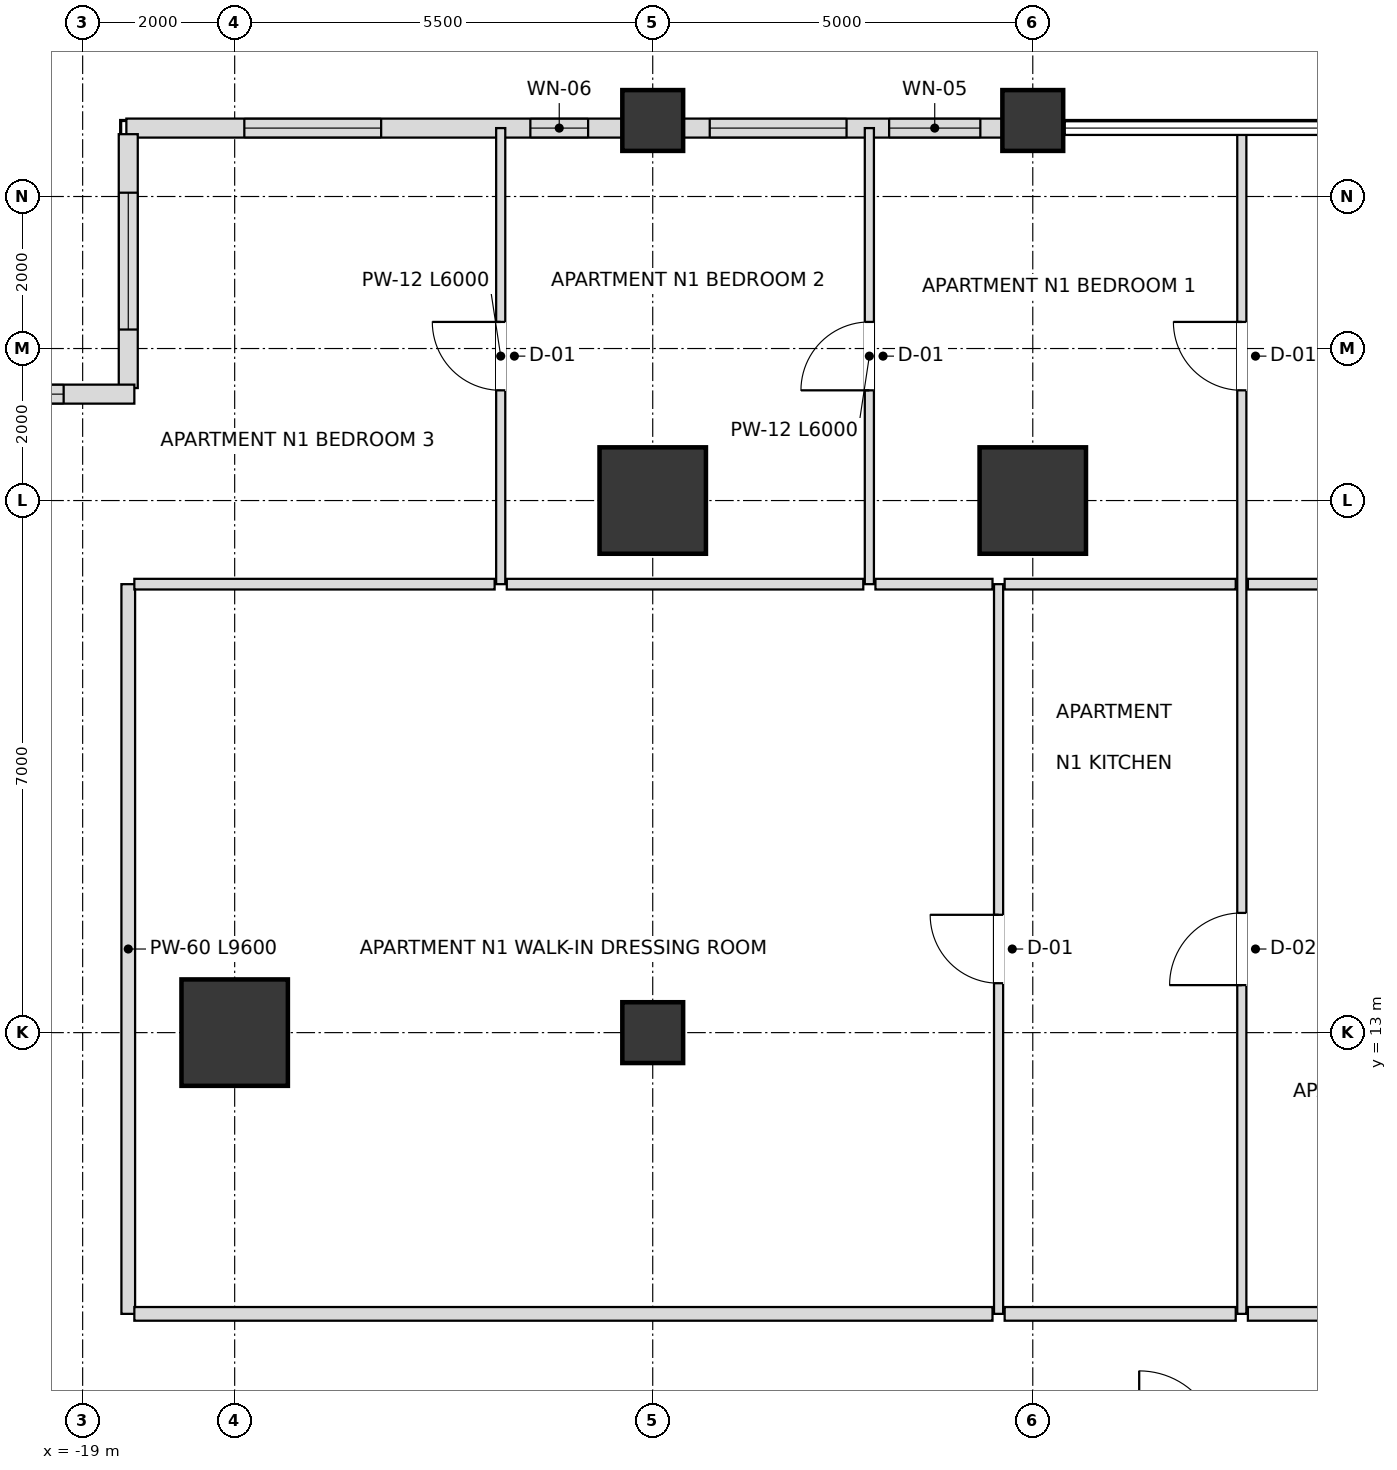
"""IFC4 building model, lengths in metres.
Left out: names, types, materials, properties, quantities, classifications, styles, units other than length and angle.
Written with IfcOpenShell. Run it as: python <this file> out.ifc"""

import sys

from ifc_helpers import new_model, si_unit, direction, frame, frame_2d, origin, origin_2d, place, context, subcontext, project, spatial, rectangle, extrude, element, fill, save


model = new_model("IFC4")
c1 = context("Model", 3, precision=1e-05, world=origin(), true_north=direction((0.0, 1.0)))
c2 = subcontext(c1, "Body", "Model", "MODEL_VIEW")
j1 = project(units=[si_unit("LENGTHUNIT", "METRE"), si_unit("PLANEANGLEUNIT", "RADIAN")], contexts=[c1])
p1 = place(None, origin())
s1 = spatial("IfcSite", under=j1, at=p1, CompositionType="ELEMENT")
p2 = place(p1, origin())
s2 = spatial("IfcBuilding", under=s1, at=p2, CompositionType="ELEMENT")
p3 = place(p2, frame((0.0, 0.0, 57.6)))
s3 = spatial("IfcBuildingStorey", under=s2, at=p3, CompositionType="ELEMENT", Elevation=57.6)
for number, where, z_axis, x_axis in (
    (1, (-6.5, 20.0, 0.0), (0.0, 0.0, 1.0), (1.0, 0.0, 0.0)),
    (2, (-11.5, 20.0, 0.0), (0.0, 0.0, 1.0), (1.0, 0.0, 0.0)),
    (3, (-17.0, 13.0, 0.0), (0.0, 0.0, 1.0), (1.0, 0.0, 0.0)),
):
    element("IfcColumn", number, at=place(p3, frame(where, z_axis=z_axis, x_axis=x_axis)), inside=s3, PredefinedType="USERDEFINED", context=c2, shape_type="SweptSolid", body=[
        extrude(rectangle(XDim=1.4, YDim=1.4, at=origin_2d()), origin(), (0.0, 0.0, 1.0), 3.6),
    ])
for number, where, z_axis, x_axis in (
    (4, (-11.5, 13.0, 0.0), (0.0, 0.0, 1.0), (1.0, 0.0, 0.0)),
    (5, (-11.5, 25.0, 0.0), (0.0, 0.0, 1.0), (1.0, 0.0, 0.0)),
    (6, (-6.5, 25.0, 0.0), (0.0, 0.0, 1.0), (1.0, 0.0, 0.0)),
):
    element("IfcColumn", number, at=place(p3, frame(where, z_axis=z_axis, x_axis=x_axis)), inside=s3, PredefinedType="COLUMN", context=c2, shape_type="SweptSolid", body=[
        extrude(rectangle(XDim=0.8, YDim=0.8, at=origin_2d()), origin(), (0.0, 0.0, 1.0), 3.6),
    ])
p4 = place(p3, frame((-6.895, 24.9, 0.0), z_axis=(0.0, 0.0, 1.0), x_axis=(-1.0, 0.0, 0.0)))
e7 = element("IfcWall", 7, at=p4, inside=s3, PredefinedType="SOLIDWALL", context=c2, shape_type="SweptSolid", body=[
    extrude(rectangle(XDim=4.21, YDim=0.25, at=frame_2d((2.105, 0.0))), origin(), (0.0, 0.0, 1.0), 2.736),
])
p5 = place(p4, frame((0.295, 0.0, 0.72)))
e8 = element("IfcOpeningElement", 8, at=p5, cuts=e7, PredefinedType="OPENING", context=c2, shape_type="SweptSolid", body=[
    extrude(rectangle(XDim=1.2, YDim=1.68, at=frame_2d((0.6, 0.84))), frame((0.0, 0.135, 0.0), z_axis=(0.0, -1.0, 0.0), x_axis=(1.0, 0.0, 0.0)), (0.0, 0.0, 1.0), 0.27),
])
p6 = place(p4, frame((2.055, 0.0, 0.72)))
e9 = element("IfcOpeningElement", 9, at=p6, cuts=e7, PredefinedType="OPENING", context=c2, shape_type="SweptSolid", body=[
    extrude(rectangle(XDim=1.8, YDim=1.68, at=frame_2d((0.9, 0.84))), frame((0.0, 0.135, 0.0), z_axis=(0.0, -1.0, 0.0), x_axis=(1.0, 0.0, 0.0)), (0.0, 0.0, 1.0), 0.27),
])
p7 = place(p3, frame((-11.895, 24.9, 0.0), z_axis=(0.0, 0.0, 1.0), x_axis=(-1.0, 0.0, 0.0)))
e10 = element("IfcWall", 10, at=p7, inside=s3, PredefinedType="SOLIDWALL", context=c2, shape_type="SweptSolid", body=[
    extrude(rectangle(XDim=6.53, YDim=0.25, at=frame_2d((3.265, 0.0))), origin(), (0.0, 0.0, 1.0), 2.736),
])
p8 = place(p7, frame((0.455, 0.0, 0.72)))
e11 = element("IfcOpeningElement", 11, at=p8, cuts=e10, PredefinedType="OPENING", context=c2, shape_type="SweptSolid", body=[
    extrude(rectangle(XDim=0.76, YDim=1.68, at=frame_2d((0.38, 0.84))), frame((0.0, 0.135, 0.0), z_axis=(0.0, -1.0, 0.0), x_axis=(1.0, 0.0, 0.0)), (0.0, 0.0, 1.0), 0.27),
])
p9 = place(p7, frame((3.178, 0.0, 0.72)))
e12 = element("IfcOpeningElement", 12, at=p9, cuts=e10, PredefinedType="OPENING", context=c2, shape_type="SweptSolid", body=[
    extrude(rectangle(XDim=1.8, YDim=1.68, at=frame_2d((0.9, 0.84))), frame((0.0, 0.135, 0.0), z_axis=(0.0, -1.0, 0.0), x_axis=(1.0, 0.0, 0.0)), (0.0, 0.0, 1.0), 0.27),
])
p10 = place(p3, frame((-18.4, 24.82, 0.0), z_axis=(0.0, 0.0, 1.0), x_axis=(0.0, -1.0, 0.0)))
e13 = element("IfcWall", 13, at=p10, inside=s3, PredefinedType="SOLIDWALL", context=c2, shape_type="SweptSolid", body=[
    extrude(rectangle(XDim=3.34, YDim=0.25, at=frame_2d((1.67, 0.0))), origin(), (0.0, 0.0, 1.0), 2.736),
])
p11 = place(p10, frame((0.77, 0.0, 0.72)))
e14 = element("IfcOpeningElement", 14, at=p11, cuts=e13, PredefinedType="OPENING", context=c2, shape_type="SweptSolid", body=[
    extrude(rectangle(XDim=1.8, YDim=1.68, at=frame_2d((0.9, 0.84))), frame((0.0, 0.135, 0.0), z_axis=(0.0, -1.0, 0.0), x_axis=(1.0, 0.0, 0.0)), (0.0, 0.0, 1.0), 0.27),
])
p12 = place(p3, frame((-18.32, 21.4, 0.0), z_axis=(0.0, 0.0, 1.0), x_axis=(-1.0, 0.0, 0.0)))
e15 = element("IfcWall", 15, at=p12, inside=s3, PredefinedType="SOLIDWALL", context=c2, shape_type="SweptSolid", body=[
    extrude(rectangle(XDim=3.66, YDim=0.25, at=frame_2d((1.83, 0.0))), origin(), (0.0, 0.0, 1.0), 2.736),
])
p13 = place(p12, frame((0.93, 0.0, 0.72)))
e16 = element("IfcOpeningElement", 16, at=p13, cuts=e15, PredefinedType="OPENING", context=c2, shape_type="SweptSolid", body=[
    extrude(rectangle(XDim=1.8, YDim=1.68, at=frame_2d((0.9, 0.84))), frame((0.0, 0.135, 0.0), z_axis=(0.0, -1.0, 0.0), x_axis=(1.0, 0.0, 0.0)), (0.0, 0.0, 1.0), 0.27),
])
p14 = place(p3, frame((-18.4, 9.3, 0.0), z_axis=(0.0, 0.0, 1.0), x_axis=(0.0, 1.0, 0.0)))
e17 = element("IfcWall", 17, at=p14, inside=s3, PredefinedType="PARTITIONING", context=c2, shape_type="SweptSolid", body=[
    extrude(rectangle(XDim=9.6, YDim=0.18, at=frame_2d((4.8, 0.0))), origin(), (0.0, 0.0, 1.0), 2.736),
])
p15 = place(p3, frame((-13.5, 18.9, 0.0), z_axis=(0.0, 0.0, 1.0), x_axis=(0.0, 1.0, 0.0)))
e18 = element("IfcWall", 18, at=p15, inside=s3, PredefinedType="PARTITIONING", context=c2, shape_type="SweptSolid", body=[
    extrude(rectangle(XDim=6.0, YDim=0.12, at=frame_2d((3.0, 0.0))), origin(), (0.0, 0.0, 1.0), 2.736),
])
p16 = place(p15, frame((2.55, 0.0, 0.0)))
e19 = element("IfcOpeningElement", 19, at=p16, cuts=e18, PredefinedType="OPENING", context=c2, shape_type="SweptSolid", body=[
    extrude(rectangle(XDim=0.9, YDim=2.1, at=frame_2d((0.45, 1.05))), frame((0.0, 0.07, 0.0), z_axis=(0.0, -1.0, 0.0), x_axis=(1.0, 0.0, 0.0)), (0.0, 0.0, 1.0), 0.14),
])
p17 = place(p3, frame((-8.65, 18.9, 0.0), z_axis=(0.0, 0.0, 1.0), x_axis=(0.0, 1.0, 0.0)))
e20 = element("IfcWall", 20, at=p17, inside=s3, PredefinedType="PARTITIONING", context=c2, shape_type="SweptSolid", body=[
    extrude(rectangle(XDim=6.0, YDim=0.12, at=frame_2d((3.0, 0.0))), origin(), (0.0, 0.0, 1.0), 2.816),
])
p18 = place(p17, frame((2.55, 0.0, 0.0)))
e21 = element("IfcOpeningElement", 21, at=p18, cuts=e20, PredefinedType="OPENING", context=c2, shape_type="SweptSolid", body=[
    extrude(rectangle(XDim=0.9, YDim=2.1, at=frame_2d((0.45, 1.05))), frame((0.0, 0.07, 0.0), z_axis=(0.0, -1.0, 0.0), x_axis=(1.0, 0.0, 0.0)), (0.0, 0.0, 1.0), 0.14),
])
p19 = place(p3, frame((-6.95, 9.3, 0.0), z_axis=(0.0, 0.0, 1.0), x_axis=(0.0, 1.0, 0.0)))
e22 = element("IfcWall", 22, at=p19, inside=s3, PredefinedType="PARTITIONING", context=c2, shape_type="SweptSolid", body=[
    extrude(rectangle(XDim=9.6, YDim=0.12, at=frame_2d((4.8, 0.0))), origin(), (0.0, 0.0, 1.0), 2.816),
])
p20 = place(p19, frame((4.35, 0.0, 0.0)))
e23 = element("IfcOpeningElement", 23, at=p20, cuts=e22, PredefinedType="OPENING", context=c2, shape_type="SweptSolid", body=[
    extrude(rectangle(XDim=0.9, YDim=2.1, at=frame_2d((0.45, 1.05))), frame((0.0, 0.07, 0.0), z_axis=(0.0, -1.0, 0.0), x_axis=(1.0, 0.0, 0.0)), (0.0, 0.0, 1.0), 0.14),
])
p21 = place(p3, frame((-3.75, 9.3, 0.0), z_axis=(0.0, 0.0, 1.0), x_axis=(0.0, 1.0, 0.0)))
e24 = element("IfcWall", 24, at=p21, inside=s3, PredefinedType="PARTITIONING", context=c2, shape_type="SweptSolid", body=[
    extrude(rectangle(XDim=15.6, YDim=0.12, at=frame_2d((7.8, 0.0))), origin(), (0.0, 0.0, 1.0), 2.816),
])
p22 = place(p21, frame((4.325, 0.0, 0.0)))
e25 = element("IfcOpeningElement", 25, at=p22, cuts=e24, PredefinedType="OPENING", context=c2, shape_type="SweptSolid", body=[
    extrude(rectangle(XDim=0.95, YDim=2.1, at=frame_2d((0.475, 1.05))), frame((0.0, 0.07, 0.0), z_axis=(0.0, -1.0, 0.0), x_axis=(1.0, 0.0, 0.0)), (0.0, 0.0, 1.0), 0.14),
])
p23 = place(p21, frame((12.15, 0.0, 0.0)))
e26 = element("IfcOpeningElement", 26, at=p23, cuts=e24, PredefinedType="OPENING", context=c2, shape_type="SweptSolid", body=[
    extrude(rectangle(XDim=0.9, YDim=2.1, at=frame_2d((0.45, 1.05))), frame((0.0, 0.07, 0.0), z_axis=(0.0, -1.0, 0.0), x_axis=(1.0, 0.0, 0.0)), (0.0, 0.0, 1.0), 0.14),
])
p24 = place(p3, frame((-18.32, 9.3, 0.0), z_axis=(0.0, 0.0, 1.0), x_axis=(1.0, 0.0, 0.0)))
e27 = element("IfcWall", 27, at=p24, inside=s3, PredefinedType="PARTITIONING", context=c2, shape_type="SweptSolid", body=[
    extrude(rectangle(XDim=11.29, YDim=0.18, at=frame_2d((5.645, 0.0))), origin(), (0.0, 0.0, 1.0), 2.816),
])
p25 = place(p3, frame((-6.87, 9.3, 0.0), z_axis=(0.0, 0.0, 1.0), x_axis=(1.0, 0.0, 0.0)))
e28 = element("IfcWall", 28, at=p25, inside=s3, PredefinedType="PARTITIONING", context=c2, shape_type="SweptSolid", body=[
    extrude(rectangle(XDim=3.04, YDim=0.18, at=frame_2d((1.52, 0.0))), origin(), (0.0, 0.0, 1.0), 2.816),
])
p26 = place(p3, frame((-3.67, 9.3, 0.0), z_axis=(0.0, 0.0, 1.0), x_axis=(1.0, 0.0, 0.0)))
e29 = element("IfcWall", 29, at=p26, inside=s3, PredefinedType="PARTITIONING", context=c2, shape_type="SweptSolid", body=[
    extrude(rectangle(XDim=4.04, YDim=0.18, at=frame_2d((2.02, 0.0))), origin(), (0.0, 0.0, 1.0), 3.38),
])
p27 = place(p26, frame((1.535, 0.0, 0.0)))
e30 = element("IfcOpeningElement", 30, at=p27, cuts=e29, PredefinedType="OPENING", context=c2, shape_type="SweptSolid", body=[
    extrude(rectangle(XDim=0.95, YDim=2.15, at=frame_2d((0.475, 1.075))), frame((0.0, 0.1, 0.0), z_axis=(0.0, -1.0, 0.0), x_axis=(1.0, 0.0, 0.0)), (0.0, 0.0, 1.0), 0.2),
])
p28 = place(p3, frame((-18.32, 18.9, 0.0), z_axis=(0.0, 0.0, 1.0), x_axis=(1.0, 0.0, 0.0)))
e31 = element("IfcWall", 31, at=p28, inside=s3, PredefinedType="PARTITIONING", context=c2, shape_type="SweptSolid", body=[
    extrude(rectangle(XDim=4.74, YDim=0.14, at=frame_2d((2.37, 0.0))), origin(), (0.0, 0.0, 1.0), 2.736),
])
p29 = place(p3, frame((-13.42, 18.9, 0.0), z_axis=(0.0, 0.0, 1.0), x_axis=(1.0, 0.0, 0.0)))
e32 = element("IfcWall", 32, at=p29, inside=s3, PredefinedType="PARTITIONING", context=c2, shape_type="SweptSolid", body=[
    extrude(rectangle(XDim=4.69, YDim=0.14, at=frame_2d((2.345, 0.0))), origin(), (0.0, 0.0, 1.0), 2.736),
])
p30 = place(p3, frame((-8.57, 18.9, 0.0), z_axis=(0.0, 0.0, 1.0), x_axis=(1.0, 0.0, 0.0)))
e33 = element("IfcWall", 33, at=p30, inside=s3, PredefinedType="PARTITIONING", context=c2, shape_type="SweptSolid", body=[
    extrude(rectangle(XDim=1.54, YDim=0.14, at=frame_2d((0.77, 0.0))), origin(), (0.0, 0.0, 1.0), 3.38),
])
p31 = place(p3, frame((-6.87, 18.9, 0.0), z_axis=(0.0, 0.0, 1.0), x_axis=(1.0, 0.0, 0.0)))
e34 = element("IfcWall", 34, at=p31, inside=s3, PredefinedType="PARTITIONING", context=c2, shape_type="SweptSolid", body=[
    extrude(rectangle(XDim=3.04, YDim=0.14, at=frame_2d((1.52, 0.0))), origin(), (0.0, 0.0, 1.0), 2.816),
])
p32 = place(p3, frame((-3.67, 18.9, 0.0), z_axis=(0.0, 0.0, 1.0), x_axis=(1.0, 0.0, 0.0)))
e35 = element("IfcWall", 35, at=p32, inside=s3, PredefinedType="PARTITIONING", context=c2, shape_type="SweptSolid", body=[
    extrude(rectangle(XDim=4.04, YDim=0.14, at=frame_2d((2.02, 0.0))), origin(), (0.0, 0.0, 1.0), 3.38),
])
p33 = place(p32, frame((1.535, 0.0, 0.0)))
e36 = element("IfcOpeningElement", 36, at=p33, cuts=e35, PredefinedType="OPENING", context=c2, shape_type="SweptSolid", body=[
    extrude(rectangle(XDim=0.95, YDim=2.1, at=frame_2d((0.475, 1.05))), frame((0.0, 0.08, 0.0), z_axis=(0.0, -1.0, 0.0), x_axis=(1.0, 0.0, 0.0)), (0.0, 0.0, 1.0), 0.16),
])
p34 = place(p5, origin())
e37 = element("IfcWindow", 37, at=p34, inside=s3, PartitioningType="SINGLE_PANEL", PredefinedType="WINDOW", context=c2, shape_type="SweptSolid", body=[
    extrude(rectangle(XDim=1.2, YDim=1.68, at=frame_2d((0.6, 0.84))), frame((0.0, 0.03, 0.0), z_axis=(0.0, -1.0, 0.0), x_axis=(1.0, 0.0, 0.0)), (0.0, 0.0, 1.0), 0.06),
])
fill(e8, e37)
p35 = place(p6, origin())
e38 = element("IfcWindow", 38, at=p35, inside=s3, PartitioningType="SINGLE_PANEL", PredefinedType="WINDOW", context=c2, shape_type="SweptSolid", body=[
    extrude(rectangle(XDim=1.8, YDim=1.68, at=frame_2d((0.9, 0.84))), frame((0.0, 0.03, 0.0), z_axis=(0.0, -1.0, 0.0), x_axis=(1.0, 0.0, 0.0)), (0.0, 0.0, 1.0), 0.06),
])
fill(e9, e38)
p36 = place(p8, origin())
e39 = element("IfcWindow", 39, at=p36, inside=s3, PartitioningType="SINGLE_PANEL", PredefinedType="WINDOW", context=c2, shape_type="SweptSolid", body=[
    extrude(rectangle(XDim=0.76, YDim=1.68, at=frame_2d((0.38, 0.84))), frame((0.0, 0.03, 0.0), z_axis=(0.0, -1.0, 0.0), x_axis=(1.0, 0.0, 0.0)), (0.0, 0.0, 1.0), 0.06),
])
fill(e11, e39)
p37 = place(p9, origin())
e40 = element("IfcWindow", 40, at=p37, inside=s3, PartitioningType="SINGLE_PANEL", PredefinedType="WINDOW", context=c2, shape_type="SweptSolid", body=[
    extrude(rectangle(XDim=1.8, YDim=1.68, at=frame_2d((0.9, 0.84))), frame((0.0, 0.03, 0.0), z_axis=(0.0, -1.0, 0.0), x_axis=(1.0, 0.0, 0.0)), (0.0, 0.0, 1.0), 0.06),
])
fill(e12, e40)
p38 = place(p11, origin())
e41 = element("IfcWindow", 41, at=p38, inside=s3, PartitioningType="SINGLE_PANEL", PredefinedType="WINDOW", context=c2, shape_type="SweptSolid", body=[
    extrude(rectangle(XDim=1.8, YDim=1.68, at=frame_2d((0.9, 0.84))), frame((0.0, 0.03, 0.0), z_axis=(0.0, -1.0, 0.0), x_axis=(1.0, 0.0, 0.0)), (0.0, 0.0, 1.0), 0.06),
])
fill(e14, e41)
p39 = place(p13, origin())
e42 = element("IfcWindow", 42, at=p39, inside=s3, PartitioningType="SINGLE_PANEL", PredefinedType="WINDOW", context=c2, shape_type="SweptSolid", body=[
    extrude(rectangle(XDim=1.8, YDim=1.68, at=frame_2d((0.9, 0.84))), frame((0.0, 0.03, 0.0), z_axis=(0.0, -1.0, 0.0), x_axis=(1.0, 0.0, 0.0)), (0.0, 0.0, 1.0), 0.06),
])
fill(e16, e42)
p40 = place(p22, origin())
e43 = element("IfcDoor", 43, at=p40, inside=s3, OperationType="SINGLE_SWING_LEFT", PredefinedType="DOOR", context=c2, shape_type="SweptSolid", body=[
    extrude(rectangle(XDim=0.95, YDim=2.1, at=frame_2d((0.475, 1.05))), frame((0.0, 0.025, 0.0), z_axis=(0.0, -1.0, 0.0), x_axis=(1.0, 0.0, 0.0)), (0.0, 0.0, 1.0), 0.05),
])
fill(e25, e43)
p41 = place(p20, origin())
e44 = element("IfcDoor", 44, at=p41, inside=s3, OperationType="SINGLE_SWING_RIGHT", PredefinedType="DOOR", context=c2, shape_type="SweptSolid", body=[
    extrude(rectangle(XDim=0.9, YDim=2.1, at=frame_2d((0.45, 1.05))), frame((0.0, 0.025, 0.0), z_axis=(0.0, -1.0, 0.0), x_axis=(1.0, 0.0, 0.0)), (0.0, 0.0, 1.0), 0.05),
])
fill(e23, e44)
p42 = place(p23, origin())
e45 = element("IfcDoor", 45, at=p42, inside=s3, OperationType="SINGLE_SWING_RIGHT", PredefinedType="DOOR", context=c2, shape_type="SweptSolid", body=[
    extrude(rectangle(XDim=0.9, YDim=2.1, at=frame_2d((0.45, 1.05))), frame((0.0, 0.025, 0.0), z_axis=(0.0, -1.0, 0.0), x_axis=(1.0, 0.0, 0.0)), (0.0, 0.0, 1.0), 0.05),
])
fill(e26, e45)
p43 = place(p18, origin())
e46 = element("IfcDoor", 46, at=p43, inside=s3, OperationType="SINGLE_SWING_LEFT", PredefinedType="DOOR", context=c2, shape_type="SweptSolid", body=[
    extrude(rectangle(XDim=0.9, YDim=2.1, at=frame_2d((0.45, 1.05))), frame((0.0, 0.025, 0.0), z_axis=(0.0, -1.0, 0.0), x_axis=(1.0, 0.0, 0.0)), (0.0, 0.0, 1.0), 0.05),
])
fill(e21, e46)
p44 = place(p16, origin())
e47 = element("IfcDoor", 47, at=p44, inside=s3, OperationType="SINGLE_SWING_RIGHT", PredefinedType="DOOR", context=c2, shape_type="SweptSolid", body=[
    extrude(rectangle(XDim=0.9, YDim=2.1, at=frame_2d((0.45, 1.05))), frame((0.0, 0.025, 0.0), z_axis=(0.0, -1.0, 0.0), x_axis=(1.0, 0.0, 0.0)), (0.0, 0.0, 1.0), 0.05),
])
fill(e19, e47)
save(model, sys.argv[1])
